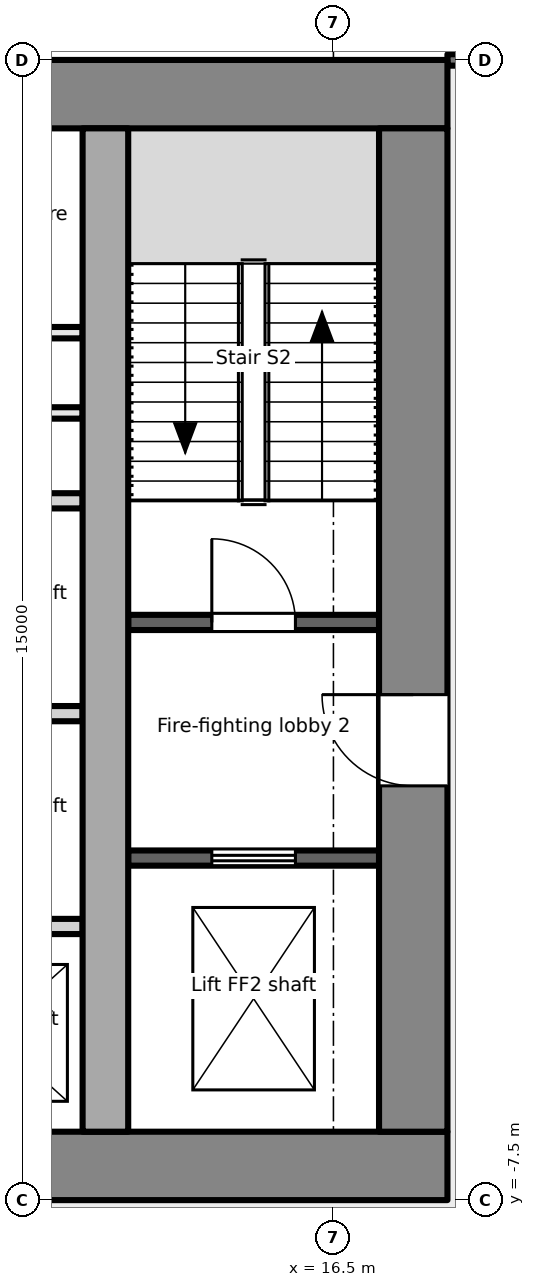
"""IFC4 building model, lengths in metres.
Left out: names, types, materials, properties, quantities, classifications, styles, units other than length and angle.
Written with IfcOpenShell. Run it as: python <this file> out.ifc"""

import sys

from ifc_helpers import new_model, si_unit, direction, frame, frame_2d, origin, place, context, subcontext, project, spatial, rectangle, extrude, element, fill, save


model = new_model("IFC4")
c1 = context("Model", 3, precision=1e-05, world=origin(), true_north=direction((0.0, 1.0)))
c2 = subcontext(c1, "Body", "Model", "MODEL_VIEW")
j1 = project(units=[si_unit("LENGTHUNIT", "METRE"), si_unit("PLANEANGLEUNIT", "RADIAN")], contexts=[c1])
p1 = place(None, origin())
s1 = spatial("IfcSite", under=j1, at=p1, CompositionType="ELEMENT")
p2 = place(p1, origin())
s2 = spatial("IfcBuilding", under=s1, at=p2, CompositionType="ELEMENT")
p3 = place(p2, frame((0.0, 0.0, 17.4)))
s3 = spatial("IfcBuildingStorey", under=s2, at=p3, CompositionType="ELEMENT", Elevation=17.4)
p4 = place(p3, frame((-18.0, -7.05, -0.2), z_axis=(0.0, 0.0, 1.0), x_axis=(1.0, 0.0, 0.0)))
e1 = element("IfcWall", 1, at=p4, inside=s3, PredefinedType="SHEAR", context=c2, shape_type="SweptSolid", body=[
    extrude(rectangle(XDim=36.0, YDim=0.9, at=frame_2d((18.0, 0.0))), origin(), (0.0, 0.0, 1.0), 4.8),
])
p5 = place(p4, frame((7.8, 0.0, 0.2)))
e2 = element("IfcOpeningElement", 2, at=p5, cuts=e1, PredefinedType="OPENING", context=c2, shape_type="SweptSolid", body=[
    extrude(rectangle(XDim=2.4, YDim=2.1, at=frame_2d((1.2, 1.05))), frame((0.0, 0.46, 0.0), z_axis=(0.0, -1.0, 0.0), x_axis=(1.0, 0.0, 0.0)), (0.0, 0.0, 1.0), 0.921),
])
p6 = place(p4, frame((17.4, 0.0, 0.2)))
e3 = element("IfcOpeningElement", 3, at=p6, cuts=e1, PredefinedType="OPENING", context=c2, shape_type="SweptSolid", body=[
    extrude(rectangle(XDim=1.2, YDim=2.1, at=frame_2d((0.6, 1.05))), frame((0.0, 0.46, 0.0), z_axis=(0.0, -1.0, 0.0), x_axis=(1.0, 0.0, 0.0)), (0.0, 0.0, 1.0), 0.921),
])
p7 = place(p4, frame((26.1, 0.0, 0.2)))
e4 = element("IfcOpeningElement", 4, at=p7, cuts=e1, PredefinedType="OPENING", context=c2, shape_type="SweptSolid", body=[
    extrude(rectangle(XDim=2.4, YDim=2.1, at=frame_2d((1.2, 1.05))), frame((0.0, 0.46, 0.0), z_axis=(0.0, -1.0, 0.0), x_axis=(1.0, 0.0, 0.0)), (0.0, 0.0, 1.0), 0.921),
])
p8 = place(p3, frame((-18.0, 7.05, -0.2), z_axis=(0.0, 0.0, 1.0), x_axis=(1.0, 0.0, 0.0)))
e5 = element("IfcWall", 5, at=p8, inside=s3, PredefinedType="SHEAR", context=c2, shape_type="SweptSolid", body=[
    extrude(rectangle(XDim=36.0, YDim=0.9, at=frame_2d((18.0, 0.0))), origin(), (0.0, 0.0, 1.0), 4.8),
])
p9 = place(p3, frame((17.55, -6.6, -0.2), z_axis=(0.0, 0.0, 1.0), x_axis=(0.0, 1.0, 0.0)))
e6 = element("IfcWall", 6, at=p9, inside=s3, PredefinedType="SHEAR", context=c2, shape_type="SweptSolid", body=[
    extrude(rectangle(XDim=13.2, YDim=0.9, at=frame_2d((6.6, 0.0))), origin(), (0.0, 0.0, 1.0), 4.8),
])
p10 = place(p9, frame((4.55, 0.0, 0.2)))
e7 = element("IfcOpeningElement", 7, at=p10, cuts=e6, PredefinedType="OPENING", context=c2, shape_type="SweptSolid", body=[
    extrude(rectangle(XDim=1.2, YDim=2.1, at=frame_2d((0.6, 1.05))), frame((0.0, 0.46, 0.0), z_axis=(0.0, -1.0, 0.0), x_axis=(1.0, 0.0, 0.0)), (0.0, 0.0, 1.0), 0.921),
])
p11 = place(p3, frame((13.5, -6.6, -0.2), z_axis=(0.0, 0.0, 1.0), x_axis=(0.0, 1.0, 0.0)))
e8 = element("IfcWall", 8, at=p11, inside=s3, PredefinedType="SHEAR", context=c2, shape_type="SweptSolid", body=[
    extrude(rectangle(XDim=13.2, YDim=0.6, at=frame_2d((6.6, 0.0))), origin(), (0.0, 0.0, 1.0), 4.8),
])
p12 = place(p3, frame((13.8, -3.0, 0.0), z_axis=(0.0, 0.0, 1.0), x_axis=(1.0, 0.0, 0.0)))
e9 = element("IfcWall", 9, at=p12, inside=s3, PredefinedType="PARTITIONING", context=c2, shape_type="SweptSolid", body=[
    extrude(rectangle(XDim=3.3, YDim=0.2, at=frame_2d((1.65, 0.0))), origin(), (0.0, 0.0, 1.0), 4.6),
])
p13 = place(p12, frame((1.1, 0.0, 0.0)))
e10 = element("IfcOpeningElement", 10, at=p13, cuts=e9, PredefinedType="OPENING", context=c2, shape_type="SweptSolid", body=[
    extrude(rectangle(XDim=1.1, YDim=2.1, at=frame_2d((0.55, 1.05))), frame((0.0, 0.111, 0.0), z_axis=(0.0, -1.0, 0.0), x_axis=(1.0, 0.0, 0.0)), (0.0, 0.0, 1.0), 0.221),
])
p14 = place(p3, frame((13.8, 0.1, 0.0), z_axis=(0.0, 0.0, 1.0), x_axis=(1.0, 0.0, 0.0)))
e11 = element("IfcWall", 11, at=p14, inside=s3, PredefinedType="PARTITIONING", context=c2, shape_type="SweptSolid", body=[
    extrude(rectangle(XDim=3.3, YDim=0.2, at=frame_2d((1.65, 0.0))), origin(), (0.0, 0.0, 1.0), 4.6),
])
p15 = place(p14, frame((1.1, 0.0, 0.0)))
e12 = element("IfcOpeningElement", 12, at=p15, cuts=e11, PredefinedType="OPENING", context=c2, shape_type="SweptSolid", body=[
    extrude(rectangle(XDim=1.1, YDim=2.1, at=frame_2d((0.55, 1.05))), frame((0.0, 0.111, 0.0), z_axis=(0.0, -1.0, 0.0), x_axis=(1.0, 0.0, 0.0)), (0.0, 0.0, 1.0), 0.221),
])
for number, where, z_axis, x_axis in (
    (13, (10.9, -3.9, 0.0), (0.0, 0.0, 1.0), (1.0, 0.0, 0.0)),
    (14, (10.9, -1.1, 0.0), (0.0, 0.0, 1.0), (1.0, 0.0, 0.0)),
    (15, (10.9, 1.7, 0.0), (0.0, 0.0, 1.0), (1.0, 0.0, 0.0)),
):
    element("IfcWall", number, at=place(p3, frame(where, z_axis=z_axis, x_axis=x_axis)), inside=s3, PredefinedType="PARTITIONING", context=c2, shape_type="SweptSolid", body=[
        extrude(rectangle(XDim=2.3, YDim=0.2, at=frame_2d((1.15, 0.0))), origin(), (0.0, 0.0, 1.0), 4.6),
    ])
for number, where, z_axis, x_axis in (
    (16, (10.9, 2.856, 0.0), (0.0, 0.0, 1.0), (1.0, 0.0, 0.0)),
    (17, (10.9, 3.912, 0.0), (0.0, 0.0, 1.0), (1.0, 0.0, 0.0)),
):
    element("IfcWall", number, at=place(p3, frame(where, z_axis=z_axis, x_axis=x_axis)), inside=s3, PredefinedType="PARTITIONING", context=c2, shape_type="SweptSolid", body=[
        extrude(rectangle(XDim=2.3, YDim=0.15, at=frame_2d((1.15, 0.0))), origin(), (0.0, 0.0, 1.0), 4.6),
    ])
p16 = place(p3, frame((18.0, 7.5, 0.0), z_axis=(0.0, 0.0, 1.0), x_axis=(1.0, 0.0, 0.0)))
e18 = element("IfcWall", 18, at=p16, inside=s3, PredefinedType="PARTITIONING", context=c2, shape_type="SweptSolid", body=[
    extrude(rectangle(XDim=3.0, YDim=0.15, at=frame_2d((1.5, 0.0))), origin(), (0.0, 0.0, 1.0), 4.3),
])
p17 = place(p16, frame((1.45, 0.0, 0.0)))
e19 = element("IfcOpeningElement", 19, at=p17, cuts=e18, PredefinedType="OPENING", context=c2, shape_type="SweptSolid", body=[
    extrude(rectangle(XDim=0.9, YDim=2.1, at=frame_2d((0.45, 1.05))), frame((0.0, 0.085, 0.0), z_axis=(0.0, -1.0, 0.0), x_axis=(1.0, 0.0, 0.0)), (0.0, 0.0, 1.0), 0.171),
])
p18 = place(p13, origin())
e20 = element("IfcDoor", 20, at=p18, inside=s3, OperationType="DOUBLE_DOOR_SLIDING", PredefinedType="DOOR", context=c2, shape_type="SweptSolid", body=[
    extrude(rectangle(XDim=1.1, YDim=2.1, at=frame_2d((0.55, 1.05))), frame((0.0, 0.025, 0.0), z_axis=(0.0, -1.0, 0.0), x_axis=(1.0, 0.0, 0.0)), (0.0, 0.0, 1.0), 0.05),
])
fill(e10, e20)
p19 = place(p10, origin())
e21 = element("IfcDoor", 21, at=p19, inside=s3, OperationType="SINGLE_SWING_RIGHT", PredefinedType="DOOR", context=c2, shape_type="SweptSolid", body=[
    extrude(rectangle(XDim=1.2, YDim=2.1, at=frame_2d((0.6, 1.05))), frame((0.0, 0.025, 0.0), z_axis=(0.0, -1.0, 0.0), x_axis=(1.0, 0.0, 0.0)), (0.0, 0.0, 1.0), 0.05),
])
fill(e7, e21)
p20 = place(p15, origin())
e22 = element("IfcDoor", 22, at=p20, inside=s3, OperationType="SINGLE_SWING_LEFT", PredefinedType="DOOR", context=c2, shape_type="SweptSolid", body=[
    extrude(rectangle(XDim=1.1, YDim=2.1, at=frame_2d((0.55, 1.05))), frame((0.0, 0.025, 0.0), z_axis=(0.0, -1.0, 0.0), x_axis=(1.0, 0.0, 0.0)), (0.0, 0.0, 1.0), 0.05),
])
fill(e12, e22)
save(model, sys.argv[1])
